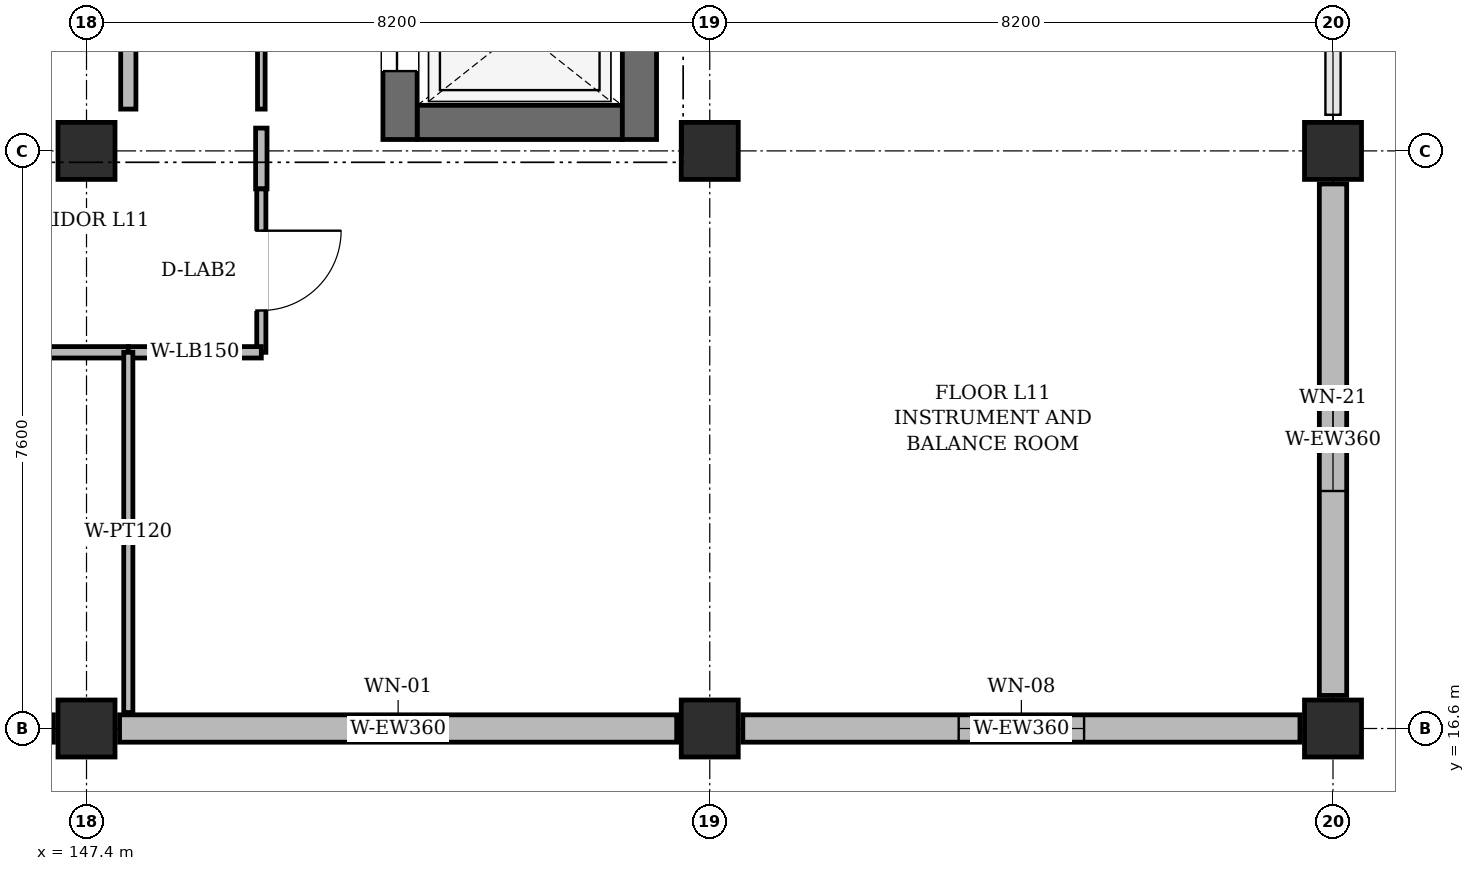
"""IFC4 building model, lengths in metres.
Left out: names, types, materials, properties, quantities, classifications, styles, units other than length and angle.
Written with IfcOpenShell. Run it as: python <this file> out.ifc"""

import sys

from ifc_helpers import new_model, si_unit, direction, frame, frame_2d, origin, origin_2d, place, context, subcontext, project, spatial, rectangle, extrude, element, fill, save


model = new_model("IFC4")
c1 = context("Model", 3, precision=1e-05, world=origin(), true_north=direction((0.0, 1.0)))
c2 = subcontext(c1, "Body", "Model", "MODEL_VIEW")
j1 = project(units=[si_unit("LENGTHUNIT", "METRE"), si_unit("PLANEANGLEUNIT", "RADIAN")], contexts=[c1])
p1 = place(None, origin())
s1 = spatial("IfcSite", under=j1, at=p1, CompositionType="ELEMENT")
p2 = place(p1, origin())
s2 = spatial("IfcBuilding", under=s1, at=p2, CompositionType="ELEMENT")
p3 = place(p2, frame((0.0, 0.0, 49.2)))
s3 = spatial("IfcBuildingStorey", under=s2, at=p3, CompositionType="ELEMENT", Elevation=49.2)
p4 = place(p3, frame((147.4, 16.6, 0.0), z_axis=(0.0, 0.0, 1.0), x_axis=(1.0, 0.0, 0.0)))
e1 = element("IfcColumn", 1, at=p4, inside=s3, PredefinedType="COLUMN", context=c2, shape_type="SweptSolid", body=[
    extrude(rectangle(XDim=0.75, YDim=0.75, at=origin_2d()), origin(), (0.0, 0.0, 1.0), 3.945),
])
p5 = place(p3, frame((147.4, 24.2, 0.0), z_axis=(0.0, 0.0, 1.0), x_axis=(1.0, 0.0, 0.0)))
e2 = element("IfcColumn", 2, at=p5, inside=s3, PredefinedType="COLUMN", context=c2, shape_type="SweptSolid", body=[
    extrude(rectangle(XDim=0.75, YDim=0.75, at=origin_2d()), origin(), (0.0, 0.0, 1.0), 3.9),
])
p6 = place(p3, frame((155.6, 16.6, 0.0), z_axis=(0.0, 0.0, 1.0), x_axis=(1.0, 0.0, 0.0)))
e3 = element("IfcColumn", 3, at=p6, inside=s3, PredefinedType="COLUMN", context=c2, shape_type="SweptSolid", body=[
    extrude(rectangle(XDim=0.75, YDim=0.75, at=origin_2d()), origin(), (0.0, 0.0, 1.0), 3.945),
])
p7 = place(p3, frame((155.6, 24.2, 0.0), z_axis=(0.0, 0.0, 1.0), x_axis=(1.0, 0.0, 0.0)))
e4 = element("IfcColumn", 4, at=p7, inside=s3, PredefinedType="COLUMN", context=c2, shape_type="SweptSolid", body=[
    extrude(rectangle(XDim=0.75, YDim=0.75, at=origin_2d()), origin(), (0.0, 0.0, 1.0), 3.9),
])
for number, where, z_axis, x_axis in (
    (5, (163.8, 16.6, 0.0), (0.0, 0.0, 1.0), (1.0, 0.0, 0.0)),
    (6, (163.8, 24.2, 0.0), (0.0, 0.0, 1.0), (1.0, 0.0, 0.0)),
):
    element("IfcColumn", number, at=place(p3, frame(where, z_axis=z_axis, x_axis=x_axis)), inside=s3, PredefinedType="COLUMN", context=c2, shape_type="SweptSolid", body=[
        extrude(rectangle(XDim=0.75, YDim=0.75, at=origin_2d()), origin(), (0.0, 0.0, 1.0), 3.945),
    ])
p8 = place(p3, frame((139.635, 16.6, 0.0), z_axis=(0.0, 0.0, 1.0), x_axis=(1.0, 0.0, 0.0)))
e7 = element("IfcWall", 7, at=p8, inside=s3, PredefinedType="SOLIDWALL", context=c2, shape_type="SweptSolid", body=[
    extrude(rectangle(XDim=7.33, YDim=0.36, at=frame_2d((3.665, 0.0))), origin(), (0.0, 0.0, 1.0), 3.33),
])
p9 = place(p8, frame((2.89, 0.0, 0.95)))
e8 = element("IfcOpeningElement", 8, at=p9, cuts=e7, PredefinedType="OPENING", context=c2, shape_type="SweptSolid", body=[
    extrude(rectangle(XDim=1.55, YDim=1.5, at=frame_2d((0.775, 0.75))), frame((0.0, 0.192, 0.0), z_axis=(0.0, -1.0, 0.0), x_axis=(1.0, 0.0, 0.0)), (0.0, 0.0, 1.0), 0.384),
])
p10 = place(p3, frame((147.835, 16.6, 0.0), z_axis=(0.0, 0.0, 1.0), x_axis=(1.0, 0.0, 0.0)))
e9 = element("IfcWall", 9, at=p10, inside=s3, PredefinedType="SOLIDWALL", context=c2, shape_type="SweptSolid", body=[
    extrude(rectangle(XDim=7.33, YDim=0.36, at=frame_2d((3.665, 0.0))), origin(), (0.0, 0.0, 1.0), 3.33),
])
p11 = place(p10, frame((3.215, 0.0, 0.95)))
e10 = element("IfcOpeningElement", 10, at=p11, cuts=e9, PredefinedType="OPENING", context=c2, shape_type="SweptSolid", body=[
    extrude(rectangle(XDim=0.9, YDim=2.1, at=frame_2d((0.45, 1.05))), frame((0.0, 0.192, 0.0), z_axis=(0.0, -1.0, 0.0), x_axis=(1.0, 0.0, 0.0)), (0.0, 0.0, 1.0), 0.384),
])
p12 = place(p3, frame((156.035, 16.6, 0.0), z_axis=(0.0, 0.0, 1.0), x_axis=(1.0, 0.0, 0.0)))
e11 = element("IfcWall", 11, at=p12, inside=s3, PredefinedType="SOLIDWALL", context=c2, shape_type="SweptSolid", body=[
    extrude(rectangle(XDim=7.33, YDim=0.36, at=frame_2d((3.665, 0.0))), origin(), (0.0, 0.0, 1.0), 3.33),
])
p13 = place(p12, frame((2.84, 0.0, 0.95)))
e12 = element("IfcOpeningElement", 12, at=p13, cuts=e11, PredefinedType="OPENING", context=c2, shape_type="SweptSolid", body=[
    extrude(rectangle(XDim=1.65, YDim=2.0, at=frame_2d((0.825, 1.0))), frame((0.0, 0.192, 0.0), z_axis=(0.0, -1.0, 0.0), x_axis=(1.0, 0.0, 0.0)), (0.0, 0.0, 1.0), 0.384),
])
p14 = place(p3, frame((163.8, 17.035, 0.0), z_axis=(0.0, 0.0, 1.0), x_axis=(0.0, 1.0, 0.0)))
e13 = element("IfcWall", 13, at=p14, inside=s3, PredefinedType="SOLIDWALL", context=c2, shape_type="SweptSolid", body=[
    extrude(rectangle(XDim=6.73, YDim=0.36, at=frame_2d((3.365, 0.0))), origin(), (0.0, 0.0, 1.0), 3.33),
])
p15 = place(p14, frame((2.69, 0.0, 0.95)))
e14 = element("IfcOpeningElement", 14, at=p15, cuts=e13, PredefinedType="OPENING", context=c2, shape_type="SweptSolid", body=[
    extrude(rectangle(XDim=1.35, YDim=1.25, at=frame_2d((0.675, 0.625))), frame((0.0, 0.192, 0.0), z_axis=(0.0, -1.0, 0.0), x_axis=(1.0, 0.0, 0.0)), (0.0, 0.0, 1.0), 0.384),
])
p16 = place(p3, frame((151.75, 24.575, 0.0), z_axis=(0.0, 0.0, 1.0), x_axis=(1.0, 0.0, 0.0)))
e15 = element("IfcWall", 15, at=p16, inside=s3, PredefinedType="SHEAR", context=c2, shape_type="SweptSolid", body=[
    extrude(rectangle(XDim=2.7, YDim=0.45, at=frame_2d((1.35, 0.0))), origin(), (0.0, 0.0, 1.0), 3.9),
])
p17 = place(p3, frame((151.525, 24.35, 0.0), z_axis=(0.0, 0.0, 1.0), x_axis=(0.0, 1.0, 0.0)))
e16 = element("IfcWall", 16, at=p17, inside=s3, PredefinedType="SHEAR", context=c2, shape_type="SweptSolid", body=[
    extrude(rectangle(XDim=2.9, YDim=0.45, at=frame_2d((1.45, 0.0))), origin(), (0.0, 0.0, 1.0), 3.9),
])
p18 = place(p17, frame((0.9, 0.0, 0.0)))
e17 = element("IfcOpeningElement", 17, at=p18, cuts=e16, PredefinedType="OPENING", context=c2, shape_type="SweptSolid", body=[
    extrude(rectangle(XDim=1.1, YDim=2.2, at=frame_2d((0.55, 1.1))), frame((0.0, 0.237, 0.0), z_axis=(0.0, -1.0, 0.0), x_axis=(1.0, 0.0, 0.0)), (0.0, 0.0, 1.0), 0.474),
])
p19 = place(p3, frame((154.675, 24.35, 0.0), z_axis=(0.0, 0.0, 1.0), x_axis=(0.0, 1.0, 0.0)))
e18 = element("IfcWall", 18, at=p19, inside=s3, PredefinedType="SHEAR", context=c2, shape_type="SweptSolid", body=[
    extrude(rectangle(XDim=2.9, YDim=0.45, at=frame_2d((1.45, 0.0))), origin(), (0.0, 0.0, 1.0), 3.9),
])
p20 = place(p3, frame((147.95, 31.75, 0.0), z_axis=(0.0, 0.0, 1.0), x_axis=(0.0, -1.0, 0.0)))
e19 = element("IfcWall", 19, at=p20, inside=s3, PredefinedType="PARTITIONING", context=c2, shape_type="SweptSolid", body=[
    extrude(rectangle(XDim=7.0, YDim=0.2, at=frame_2d((3.5, 0.0))), origin(), (0.0, 0.0, 1.0), 3.805),
])
p21 = place(p20, frame((2.75, 0.0, 0.0)))
e20 = element("IfcOpeningElement", 20, at=p21, cuts=e19, PredefinedType="OPENING", context=c2, shape_type="SweptSolid", body=[
    extrude(rectangle(XDim=1.5, YDim=2.2, at=frame_2d((0.75, 1.1))), frame((0.0, 0.112, 0.0), z_axis=(0.0, -1.0, 0.0), x_axis=(1.0, 0.0, 0.0)), (0.0, 0.0, 1.0), 0.224),
])
p22 = place(p3, frame((149.7, 24.75, 0.0), z_axis=(0.0, 0.0, 1.0), x_axis=(0.0, 1.0, 0.0)))
e21 = element("IfcWall", 21, at=p22, inside=s3, PredefinedType="PARTITIONING", context=c2, shape_type="SweptSolid", body=[
    extrude(rectangle(XDim=11.3, YDim=0.1, at=frame_2d((5.65, 0.0))), origin(), (0.0, 0.0, 1.0), 3.805),
])
p23 = place(p22, frame((4.75, 0.0, 0.0)))
e22 = element("IfcOpeningElement", 22, at=p23, cuts=e21, PredefinedType="OPENING", context=c2, shape_type="SweptSolid", body=[
    extrude(rectangle(XDim=1.8, YDim=2.4, at=frame_2d((0.9, 1.2))), frame((0.0, 0.062, 0.0), z_axis=(0.0, -1.0, 0.0), x_axis=(1.0, 0.0, 0.0)), (0.0, 0.0, 1.0), 0.124),
])
p24 = place(p3, frame((147.95, 21.55, 0.0), z_axis=(0.0, 0.0, 1.0), x_axis=(-1.0, 0.0, 0.0)))
e23 = element("IfcWall", 23, at=p24, inside=s3, PredefinedType="PARTITIONING", context=c2, shape_type="SweptSolid", body=[
    extrude(rectangle(XDim=8.75, YDim=0.15, at=frame_2d((4.375, 0.0))), origin(), (0.0, 0.0, 1.0), 3.475),
])
p25 = place(p24, frame((3.675, 0.0, 0.0)))
e24 = element("IfcOpeningElement", 24, at=p25, cuts=e23, PredefinedType="OPENING", context=c2, shape_type="SweptSolid", body=[
    extrude(rectangle(XDim=1.4, YDim=2.2, at=frame_2d((0.7, 1.1))), frame((0.0, 0.087, 0.0), z_axis=(0.0, -1.0, 0.0), x_axis=(1.0, 0.0, 0.0)), (0.0, 0.0, 1.0), 0.174),
])
p26 = place(p3, frame((149.7, 24.5, 0.0), z_axis=(0.0, 0.0, 1.0), x_axis=(0.0, -1.0, 0.0)))
e25 = element("IfcWall", 25, at=p26, inside=s3, PredefinedType="PARTITIONING", context=c2, shape_type="SweptSolid", body=[
    extrude(rectangle(XDim=0.8, YDim=0.15, at=frame_2d((0.4, 0.0))), origin(), (0.0, 0.0, 1.0), 3.805),
])
p27 = place(p3, frame((149.7, 23.7, 0.0), z_axis=(0.0, 0.0, 1.0), x_axis=(0.0, -1.0, 0.0)))
e26 = element("IfcWall", 26, at=p27, inside=s3, PredefinedType="PARTITIONING", context=c2, shape_type="SweptSolid", body=[
    extrude(rectangle(XDim=2.15, YDim=0.12, at=frame_2d((1.075, 0.0))), origin(), (0.0, 0.0, 1.0), 3.805),
])
p28 = place(p27, frame((0.55, 0.0, 0.0)))
e27 = element("IfcOpeningElement", 27, at=p28, cuts=e26, PredefinedType="OPENING", context=c2, shape_type="SweptSolid", body=[
    extrude(rectangle(XDim=1.05, YDim=2.2, at=frame_2d((0.525, 1.1))), frame((0.0, 0.072, 0.0), z_axis=(0.0, -1.0, 0.0), x_axis=(1.0, 0.0, 0.0)), (0.0, 0.0, 1.0), 0.144),
])
p29 = place(p3, frame((149.7, 21.55, 0.0), z_axis=(0.0, 0.0, 1.0), x_axis=(-1.0, 0.0, 0.0)))
e28 = element("IfcWall", 28, at=p29, inside=s3, PredefinedType="PARTITIONING", context=c2, shape_type="SweptSolid", body=[
    extrude(rectangle(XDim=1.75, YDim=0.15, at=frame_2d((0.875, 0.0))), origin(), (0.0, 0.0, 1.0), 3.475),
])
p30 = place(p3, frame((147.95, 21.55, 0.0), z_axis=(0.0, 0.0, 1.0), x_axis=(0.0, -1.0, 0.0)))
e29 = element("IfcWall", 29, at=p30, inside=s3, PredefinedType="PARTITIONING", context=c2, shape_type="SweptSolid", body=[
    extrude(rectangle(XDim=4.74, YDim=0.12, at=frame_2d((2.37, 0.0))), origin(), (0.0, 0.0, 1.0), 3.805),
])
p31 = place(p11, origin())
e30 = element("IfcWindow", 30, at=p31, inside=s3, PartitioningType="SINGLE_PANEL", PredefinedType="WINDOW", context=c2, shape_type="SweptSolid", body=[
    extrude(rectangle(XDim=0.9, YDim=2.1, at=frame_2d((0.45, 1.05))), frame((0.0, 0.03, 0.0), z_axis=(0.0, -1.0, 0.0), x_axis=(1.0, 0.0, 0.0)), (0.0, 0.0, 1.0), 0.06),
])
fill(e10, e30)
p32 = place(p13, origin())
e31 = element("IfcWindow", 31, at=p32, inside=s3, PartitioningType="DOUBLE_PANEL_VERTICAL", PredefinedType="WINDOW", context=c2, shape_type="SweptSolid", body=[
    extrude(rectangle(XDim=1.65, YDim=2.0, at=frame_2d((0.825, 1.0))), frame((0.0, 0.03, 0.0), z_axis=(0.0, -1.0, 0.0), x_axis=(1.0, 0.0, 0.0)), (0.0, 0.0, 1.0), 0.06),
])
fill(e12, e31)
p33 = place(p15, origin())
e32 = element("IfcWindow", 32, at=p33, inside=s3, PartitioningType="SINGLE_PANEL", PredefinedType="WINDOW", context=c2, shape_type="SweptSolid", body=[
    extrude(rectangle(XDim=1.35, YDim=1.25, at=frame_2d((0.675, 0.625))), frame((0.0, 0.03, 0.0), z_axis=(0.0, -1.0, 0.0), x_axis=(1.0, 0.0, 0.0)), (0.0, 0.0, 1.0), 0.06),
])
fill(e14, e32)
p34 = place(p18, origin())
e33 = element("IfcDoor", 33, at=p34, inside=s3, OperationType="DOUBLE_DOOR_SLIDING", PredefinedType="DOOR", context=c2, shape_type="SweptSolid", body=[
    extrude(rectangle(XDim=1.1, YDim=2.2, at=frame_2d((0.55, 1.1))), frame((0.0, 0.025, 0.0), z_axis=(0.0, -1.0, 0.0), x_axis=(1.0, 0.0, 0.0)), (0.0, 0.0, 1.0), 0.05),
])
fill(e17, e33)
p35 = place(p28, origin())
e34 = element("IfcDoor", 34, at=p35, inside=s3, OperationType="SINGLE_SWING_LEFT", PredefinedType="DOOR", context=c2, shape_type="SweptSolid", body=[
    extrude(rectangle(XDim=1.05, YDim=2.2, at=frame_2d((0.525, 1.1))), frame((0.0, 0.025, 0.0), z_axis=(0.0, -1.0, 0.0), x_axis=(1.0, 0.0, 0.0)), (0.0, 0.0, 1.0), 0.05),
])
fill(e27, e34)
save(model, sys.argv[1])
